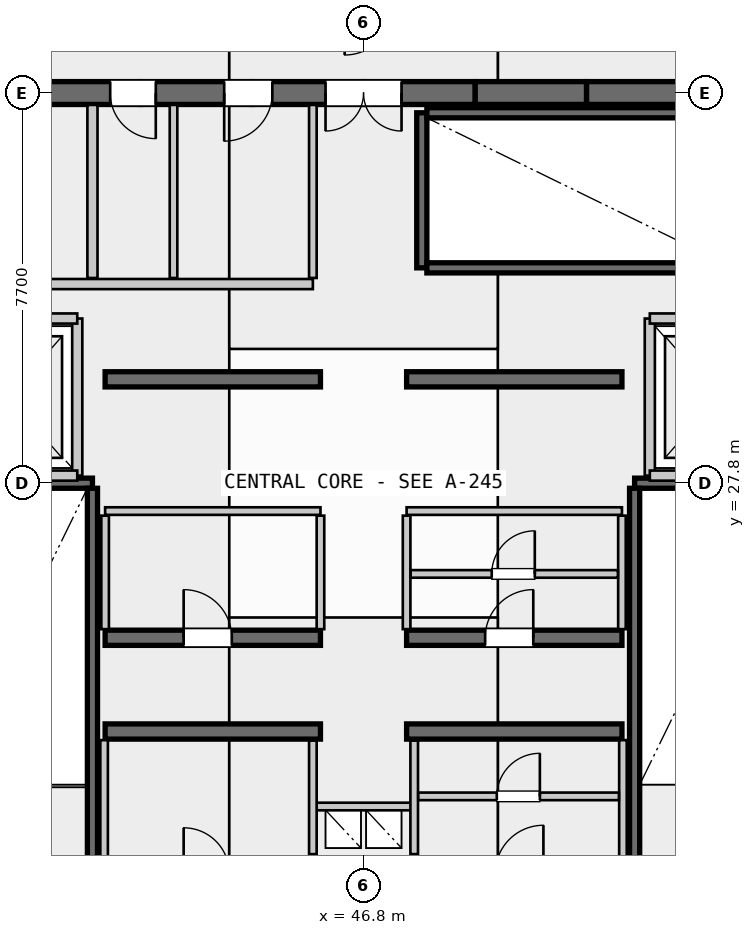
"""IFC4 building model, lengths in metres.
Left out: names, types, materials, properties, quantities, classifications, styles, units other than length and angle.
Written with IfcOpenShell. Run it as: python <this file> out.ifc"""

import sys

from ifc_helpers import new_model, si_unit, direction, frame, frame_2d, origin, place, context, subcontext, project, spatial, rectangle, extrude, source, transform, mapped, element, fill, save


model = new_model("IFC4")
c1 = context("Model", 3, precision=1e-05, world=origin(), true_north=direction((0.0, 1.0)))
c2 = subcontext(c1, "Body", "Model", "MODEL_VIEW")
j1 = project(units=[si_unit("LENGTHUNIT", "METRE"), si_unit("PLANEANGLEUNIT", "RADIAN")], contexts=[c1])
p1 = place(None, origin())
s1 = spatial("IfcSite", under=j1, at=p1, CompositionType="ELEMENT")
p2 = place(p1, origin())
s2 = spatial("IfcBuilding", under=s1, at=p2, CompositionType="ELEMENT")
p3 = place(p2, frame((0.0, 0.0, 324.3)))
s3 = spatial("IfcBuildingStorey", under=s2, at=p3, CompositionType="ELEMENT", Elevation=324.3)
p4 = place(p3, frame((55.6, 35.5, 0.0), z_axis=(0.0, 0.0, 1.0), x_axis=(-1.0, 0.0, 0.0)))
e1 = element("IfcWall", 1, at=p4, inside=s3, PredefinedType="SHEAR", context=c2, shape_type="SweptSolid", body=[
    extrude(rectangle(XDim=17.6, YDim=0.45, at=frame_2d((8.8, 0.0))), origin(), (0.0, 0.0, 1.0), 4.2),
])
p5 = place(p4, frame((8.05, 0.0, 0.0)))
e2 = element("IfcOpeningElement", 2, at=p5, cuts=e1, PredefinedType="OPENING", context=c2, shape_type="SweptSolid", body=[
    extrude(rectangle(XDim=1.5, YDim=2.2, at=frame_2d((0.75, 1.1))), frame((0.0, 0.235, 0.0), z_axis=(0.0, -1.0, 0.0), x_axis=(1.0, 0.0, 0.0)), (0.0, 0.0, 1.0), 0.47),
])
p6 = place(p4, frame((15.1, 0.0, 0.0)))
e3 = element("IfcOpeningElement", 3, at=p6, cuts=e1, PredefinedType="OPENING", context=c2, shape_type="SweptSolid", body=[
    extrude(rectangle(XDim=0.95, YDim=2.15, at=frame_2d((0.475, 1.075))), frame((0.0, 0.235, 0.0), z_axis=(0.0, -1.0, 0.0), x_axis=(1.0, 0.0, 0.0)), (0.0, 0.0, 1.0), 0.47),
])
p7 = place(p4, frame((12.9, 0.0, 0.0)))
e4 = element("IfcOpeningElement", 4, at=p7, cuts=e1, PredefinedType="OPENING", context=c2, shape_type="SweptSolid", body=[
    extrude(rectangle(XDim=0.9, YDim=2.15, at=frame_2d((0.45, 1.075))), frame((0.0, 0.235, 0.0), z_axis=(0.0, -1.0, 0.0), x_axis=(1.0, 0.0, 0.0)), (0.0, 0.0, 1.0), 0.47),
])
p8 = place(p4, frame((10.6, 0.0, 0.0)))
e5 = element("IfcOpeningElement", 5, at=p8, cuts=e1, PredefinedType="OPENING", context=c2, shape_type="SweptSolid", body=[
    extrude(rectangle(XDim=0.95, YDim=2.15, at=frame_2d((0.475, 1.075))), frame((0.0, 0.235, 0.0), z_axis=(0.0, -1.0, 0.0), x_axis=(1.0, 0.0, 0.0)), (0.0, 0.0, 1.0), 0.47),
])
for number, where, z_axis, x_axis in (
    (6, (41.7, 22.9, 0.0), (0.0, 0.0, 1.0), (1.0, 0.0, 0.0)),
    (7, (47.65, 22.9, 0.0), (0.0, 0.0, 1.0), (1.0, 0.0, 0.0)),
):
    element("IfcWall", number, at=place(p3, frame(where, z_axis=z_axis, x_axis=x_axis)), inside=s3, PredefinedType="SHEAR", context=c2, shape_type="SweptSolid", body=[
        extrude(rectangle(XDim=4.25, YDim=0.3, at=frame_2d((2.125, 0.0))), origin(), (0.0, 0.0, 1.0), 4.2),
    ])
p9 = place(p3, frame((41.7, 24.75, 0.0), z_axis=(0.0, 0.0, 1.0), x_axis=(1.0, 0.0, 0.0)))
e8 = element("IfcWall", 8, at=p9, inside=s3, PredefinedType="SHEAR", context=c2, shape_type="SweptSolid", body=[
    extrude(rectangle(XDim=4.25, YDim=0.3, at=frame_2d((2.125, 0.0))), origin(), (0.0, 0.0, 1.0), 4.2),
])
p10 = place(p9, frame((1.55, 0.0, 0.0)))
e9 = element("IfcOpeningElement", 9, at=p10, cuts=e8, PredefinedType="OPENING", context=c2, shape_type="SweptSolid", body=[
    extrude(rectangle(XDim=0.95, YDim=2.15, at=frame_2d((0.475, 1.075))), frame((0.0, 0.16, 0.0), z_axis=(0.0, -1.0, 0.0), x_axis=(1.0, 0.0, 0.0)), (0.0, 0.0, 1.0), 0.32),
])
p11 = place(p3, frame((47.65, 24.75, 0.0), z_axis=(0.0, 0.0, 1.0), x_axis=(1.0, 0.0, 0.0)))
e10 = element("IfcWall", 10, at=p11, inside=s3, PredefinedType="SHEAR", context=c2, shape_type="SweptSolid", body=[
    extrude(rectangle(XDim=4.25, YDim=0.3, at=frame_2d((2.125, 0.0))), origin(), (0.0, 0.0, 1.0), 4.2),
])
p12 = place(p11, frame((1.55, 0.0, 0.0)))
e11 = element("IfcOpeningElement", 11, at=p12, cuts=e10, PredefinedType="OPENING", context=c2, shape_type="SweptSolid", body=[
    extrude(rectangle(XDim=0.95, YDim=2.15, at=frame_2d((0.475, 1.075))), frame((0.0, 0.16, 0.0), z_axis=(0.0, -1.0, 0.0), x_axis=(1.0, 0.0, 0.0)), (0.0, 0.0, 1.0), 0.32),
])
for number, where, z_axis, x_axis in (
    (12, (41.7, 29.85, 0.0), (0.0, 0.0, 1.0), (1.0, 0.0, 0.0)),
    (13, (47.65, 29.85, 0.0), (0.0, 0.0, 1.0), (1.0, 0.0, 0.0)),
):
    element("IfcWall", number, at=place(p3, frame(where, z_axis=z_axis, x_axis=x_axis)), inside=s3, PredefinedType="SHEAR", context=c2, shape_type="SweptSolid", body=[
        extrude(rectangle(XDim=4.25, YDim=0.3, at=frame_2d((2.125, 0.0))), origin(), (0.0, 0.0, 1.0), 4.2),
    ])
p13 = place(p3, frame((53.4, 35.5, 4.2), z_axis=(0.0, 0.0, 1.0), x_axis=(-1.0, 0.0, 0.0)))
e14 = element("IfcWall", 14, at=p13, inside=s3, PredefinedType="SHEAR", context=c2, shape_type="SweptSolid", body=[
    extrude(rectangle(XDim=2.2, YDim=0.45, at=frame_2d((1.1, 0.0))), origin(), (0.0, 0.0, 1.0), 5.216),
])
p14 = place(p3, frame((51.2, 35.5, 4.2), z_axis=(0.0, 0.0, 1.0), x_axis=(-1.0, 0.0, 0.0)))
e15 = element("IfcWall", 15, at=p14, inside=s3, PredefinedType="SHEAR", context=c2, shape_type="SweptSolid", body=[
    extrude(rectangle(XDim=2.2, YDim=0.45, at=frame_2d((1.1, 0.0))), origin(), (0.0, 0.0, 1.0), 5.091),
])
p15 = place(p3, frame((49.0, 35.5, 4.2), z_axis=(0.0, 0.0, 1.0), x_axis=(-1.0, 0.0, 0.0)))
e16 = element("IfcWall", 16, at=p15, inside=s3, PredefinedType="SHEAR", context=c2, shape_type="SweptSolid", body=[
    extrude(rectangle(XDim=2.2, YDim=0.45, at=frame_2d((1.1, 0.0))), origin(), (0.0, 0.0, 1.0), 4.965),
])
p16 = place(p3, frame((46.8, 35.5, 4.2), z_axis=(0.0, 0.0, 1.0), x_axis=(-1.0, 0.0, 0.0)))
e17 = element("IfcWall", 17, at=p16, inside=s3, PredefinedType="SHEAR", context=c2, shape_type="SweptSolid", body=[
    extrude(rectangle(XDim=2.2, YDim=0.45, at=frame_2d((1.1, 0.0))), origin(), (0.0, 0.0, 1.0), 4.839),
])
p17 = place(p3, frame((44.6, 35.5, 4.2), z_axis=(0.0, 0.0, 1.0), x_axis=(-1.0, 0.0, 0.0)))
e18 = element("IfcWall", 18, at=p17, inside=s3, PredefinedType="SHEAR", context=c2, shape_type="SweptSolid", body=[
    extrude(rectangle(XDim=2.2, YDim=0.45, at=frame_2d((1.1, 0.0))), origin(), (0.0, 0.0, 1.0), 4.713),
])
p18 = place(p3, frame((42.4, 35.5, 4.2), z_axis=(0.0, 0.0, 1.0), x_axis=(-1.0, 0.0, 0.0)))
e19 = element("IfcWall", 19, at=p18, inside=s3, PredefinedType="SHEAR", context=c2, shape_type="SweptSolid", body=[
    extrude(rectangle(XDim=2.2, YDim=0.45, at=frame_2d((1.1, 0.0))), origin(), (0.0, 0.0, 1.0), 4.587),
])
p19 = place(p3, frame((38.39, 27.8, 0.0), z_axis=(0.0, 0.0, 1.0), x_axis=(1.0, 0.0, 0.0)))
e20 = element("IfcWall", 20, at=p19, inside=s3, PredefinedType="SHEAR", context=c2, shape_type="SweptSolid", body=[
    extrude(rectangle(XDim=3.06, YDim=0.2, at=frame_2d((1.53, 0.0))), origin(), (0.0, 0.0, 1.0), 4.2),
])
p20 = place(p3, frame((41.45, 27.7, 0.0), z_axis=(0.0, 0.0, 1.0), x_axis=(0.0, -1.0, 0.0)))
e21 = element("IfcWall", 21, at=p20, inside=s3, PredefinedType="SHEAR", context=c2, shape_type="SweptSolid", body=[
    extrude(rectangle(XDim=7.35, YDim=0.2, at=frame_2d((3.675, 0.0))), origin(), (0.0, 0.0, 1.0), 4.2),
])
p21 = place(p3, frame((52.15, 27.8, 0.0), z_axis=(0.0, 0.0, 1.0), x_axis=(1.0, 0.0, 0.0)))
e22 = element("IfcWall", 22, at=p21, inside=s3, PredefinedType="SHEAR", context=c2, shape_type="SweptSolid", body=[
    extrude(rectangle(XDim=3.06, YDim=0.2, at=frame_2d((1.53, 0.0))), origin(), (0.0, 0.0, 1.0), 4.2),
])
p22 = place(p3, frame((52.15, 20.35, 0.0), z_axis=(0.0, 0.0, 1.0), x_axis=(0.0, 1.0, 0.0)))
e23 = element("IfcWall", 23, at=p22, inside=s3, PredefinedType="SHEAR", context=c2, shape_type="SweptSolid", body=[
    extrude(rectangle(XDim=7.35, YDim=0.2, at=frame_2d((3.675, 0.0))), origin(), (0.0, 0.0, 1.0), 4.2),
])
p23 = place(p3, frame((47.95, 32.05, 0.0), z_axis=(0.0, 0.0, 1.0), x_axis=(0.0, 1.0, 0.0)))
e24 = element("IfcWall", 24, at=p23, inside=s3, PredefinedType="SHEAR", context=c2, shape_type="SweptSolid", body=[
    extrude(rectangle(XDim=3.06, YDim=0.2, at=frame_2d((1.53, 0.0))), origin(), (0.0, 0.0, 1.0), 4.2),
])
for number, where, z_axis, x_axis in (
    (25, (48.05, 35.11, 0.0), (0.0, 0.0, 1.0), (1.0, 0.0, 0.0)),
    (26, (55.4, 32.05, 0.0), (0.0, 0.0, 1.0), (-1.0, 0.0, 0.0)),
):
    element("IfcWall", number, at=place(p3, frame(where, z_axis=z_axis, x_axis=x_axis)), inside=s3, PredefinedType="SHEAR", context=c2, shape_type="SweptSolid", body=[
        extrude(rectangle(XDim=7.35, YDim=0.2, at=frame_2d((3.675, 0.0))), origin(), (0.0, 0.0, 1.0), 4.2),
    ])
p24 = place(p3, frame((45.8, 21.42, 0.0), z_axis=(0.0, 0.0, 1.0), x_axis=(1.0, 0.0, 0.0)))
e27 = element("IfcWall", 27, at=p24, inside=s3, PredefinedType="PARTITIONING", context=c2, shape_type="SweptSolid", body=[
    extrude(rectangle(XDim=2.0, YDim=0.15, at=frame_2d((1.0, 0.0))), origin(), (0.0, 0.0, 1.0), 3.49),
])
for number, where, z_axis, x_axis in (
    (28, (45.8, 20.48, 0.0), (0.0, 0.0, 1.0), (0.0, 1.0, 0.0)),
    (29, (47.8, 20.48, 0.0), (0.0, 0.0, 1.0), (0.0, 1.0, 0.0)),
):
    element("IfcWall", number, at=place(p3, frame(where, z_axis=z_axis, x_axis=x_axis)), inside=s3, PredefinedType="PARTITIONING", context=c2, shape_type="SweptSolid", body=[
        extrude(rectangle(XDim=2.24, YDim=0.15, at=frame_2d((1.12, 0.0))), origin(), (0.0, 0.0, 1.0), 3.49),
    ])
p25 = place(p3, frame((41.15, 27.95, 0.0), z_axis=(0.0, 0.0, 1.0), x_axis=(0.0, 1.0, 0.0)))
e30 = element("IfcWall", 30, at=p25, inside=s3, PredefinedType="PARTITIONING", context=c2, shape_type="SweptSolid", body=[
    extrude(rectangle(XDim=3.1, YDim=0.2, at=frame_2d((1.55, 0.0))), origin(), (0.0, 0.0, 1.0), 2.76),
])
for number, where, z_axis, x_axis in (
    (31, (38.235, 27.95, 0.0), (0.0, 0.0, 1.0), (1.0, 0.0, 0.0)),
    (32, (38.235, 31.05, 0.0), (0.0, 0.0, 1.0), (1.0, 0.0, 0.0)),
):
    element("IfcWall", number, at=place(p3, frame(where, z_axis=z_axis, x_axis=x_axis)), inside=s3, PredefinedType="PARTITIONING", context=c2, shape_type="SweptSolid", body=[
        extrude(rectangle(XDim=2.915, YDim=0.2, at=frame_2d((1.458, 0.0))), origin(), (0.0, 0.0, 1.0), 3.49),
    ])
p26 = place(p3, frame((52.45, 27.95, 0.0), z_axis=(0.0, 0.0, 1.0), x_axis=(0.0, 1.0, 0.0)))
e33 = element("IfcWall", 33, at=p26, inside=s3, PredefinedType="PARTITIONING", context=c2, shape_type="SweptSolid", body=[
    extrude(rectangle(XDim=3.1, YDim=0.2, at=frame_2d((1.55, 0.0))), origin(), (0.0, 0.0, 1.0), 2.76),
])
for number, where, z_axis, x_axis in (
    (34, (52.45, 27.95, 0.0), (0.0, 0.0, 1.0), (1.0, 0.0, 0.0)),
    (35, (52.45, 31.05, 0.0), (0.0, 0.0, 1.0), (1.0, 0.0, 0.0)),
):
    element("IfcWall", number, at=place(p3, frame(where, z_axis=z_axis, x_axis=x_axis)), inside=s3, PredefinedType="PARTITIONING", context=c2, shape_type="SweptSolid", body=[
        extrude(rectangle(XDim=2.915, YDim=0.2, at=frame_2d((1.458, 0.0))), origin(), (0.0, 0.0, 1.0), 3.49),
    ])
for number, where, z_axis, x_axis in (
    (36, (41.68, 20.335, 0.0), (0.0, 0.0, 1.0), (0.0, 1.0, 0.0)),
    (37, (51.92, 20.335, 0.0), (0.0, 0.0, 1.0), (0.0, 1.0, 0.0)),
):
    element("IfcWall", number, at=place(p3, frame(where, z_axis=z_axis, x_axis=x_axis)), inside=s3, PredefinedType="PARTITIONING", context=c2, shape_type="SweptSolid", body=[
        extrude(rectangle(XDim=2.395, YDim=0.15, at=frame_2d((1.198, 0.0))), origin(), (0.0, 0.0, 1.0), 3.49),
    ])
p27 = place(p3, frame((47.88, 21.62, 0.0), z_axis=(0.0, 0.0, 1.0), x_axis=(1.0, 0.0, 0.0)))
e38 = element("IfcWall", 38, at=p27, inside=s3, PredefinedType="PARTITIONING", context=c2, shape_type="SweptSolid", body=[
    extrude(rectangle(XDim=3.96, YDim=0.15, at=frame_2d((1.98, 0.0))), origin(), (0.0, 0.0, 1.0), 2.76),
])
p28 = place(p27, frame((1.55, 0.0, 0.0)))
e39 = element("IfcOpeningElement", 39, at=p28, cuts=e38, PredefinedType="OPENING", context=c2, shape_type="SweptSolid", body=[
    extrude(rectangle(XDim=0.85, YDim=2.15, at=frame_2d((0.425, 1.075))), frame((0.0, 0.085, 0.0), z_axis=(0.0, -1.0, 0.0), x_axis=(1.0, 0.0, 0.0)), (0.0, 0.0, 1.0), 0.17),
])
for number, where, z_axis, x_axis in (
    (40, (41.7, 27.25, 0.0), (0.0, 0.0, 1.0), (1.0, 0.0, 0.0)),
    (41, (47.65, 27.25, 0.0), (0.0, 0.0, 1.0), (1.0, 0.0, 0.0)),
):
    element("IfcWall", number, at=place(p3, frame(where, z_axis=z_axis, x_axis=x_axis)), inside=s3, PredefinedType="PARTITIONING", context=c2, shape_type="SweptSolid", body=[
        extrude(rectangle(XDim=4.25, YDim=0.15, at=frame_2d((2.125, 0.0))), origin(), (0.0, 0.0, 1.0), 2.76),
    ])
for number, where, z_axis, x_axis in (
    (42, (41.7, 24.92, 0.0), (0.0, 0.0, 1.0), (0.0, 1.0, 0.0)),
    (43, (45.95, 24.92, 0.0), (0.0, 0.0, 1.0), (0.0, 1.0, 0.0)),
    (44, (47.65, 24.92, 0.0), (0.0, 0.0, 1.0), (0.0, 1.0, 0.0)),
    (45, (51.9, 24.92, 0.0), (0.0, 0.0, 1.0), (0.0, 1.0, 0.0)),
):
    element("IfcWall", number, at=place(p3, frame(where, z_axis=z_axis, x_axis=x_axis)), inside=s3, PredefinedType="PARTITIONING", context=c2, shape_type="SweptSolid", body=[
        extrude(rectangle(XDim=2.24, YDim=0.15, at=frame_2d((1.12, 0.0))), origin(), (0.0, 0.0, 1.0), 2.76),
    ])
p29 = place(p3, frame((47.73, 26.01, 0.0), z_axis=(0.0, 0.0, 1.0), x_axis=(1.0, 0.0, 0.0)))
e46 = element("IfcWall", 46, at=p29, inside=s3, PredefinedType="PARTITIONING", context=c2, shape_type="SweptSolid", body=[
    extrude(rectangle(XDim=4.09, YDim=0.15, at=frame_2d((2.045, 0.0))), origin(), (0.0, 0.0, 1.0), 2.76),
])
p30 = place(p29, frame((1.6, 0.0, 0.0)))
e47 = element("IfcOpeningElement", 47, at=p30, cuts=e46, PredefinedType="OPENING", context=c2, shape_type="SweptSolid", body=[
    extrude(rectangle(XDim=0.85, YDim=2.15, at=frame_2d((0.425, 1.075))), frame((0.0, 0.085, 0.0), z_axis=(0.0, -1.0, 0.0), x_axis=(1.0, 0.0, 0.0)), (0.0, 0.0, 1.0), 0.17),
])
p31 = place(p3, frame((41.45, 31.85, 0.0), z_axis=(0.0, 0.0, 1.0), x_axis=(0.0, 1.0, 0.0)))
e48 = element("IfcWall", 48, at=p31, inside=s3, PredefinedType="PARTITIONING", context=c2, shape_type="SweptSolid", body=[
    extrude(rectangle(XDim=3.415, YDim=0.2, at=frame_2d((1.708, 0.0))), origin(), (0.0, 0.0, 1.0), 3.49),
])
p32 = place(p3, frame((38.235, 31.73, 0.0), z_axis=(0.0, 0.0, 1.0), x_axis=(1.0, 0.0, 0.0)))
e49 = element("IfcWall", 49, at=p32, inside=s3, PredefinedType="PARTITIONING", context=c2, shape_type="SweptSolid", body=[
    extrude(rectangle(XDim=7.565, YDim=0.2, at=frame_2d((3.782, 0.0))), origin(), (0.0, 0.0, 1.0), 2.76),
])
p33 = place(p3, frame((45.8, 31.85, 0.0), z_axis=(0.0, 0.0, 1.0), x_axis=(0.0, 1.0, 0.0)))
e50 = element("IfcWall", 50, at=p33, inside=s3, PredefinedType="PARTITIONING", context=c2, shape_type="SweptSolid", body=[
    extrude(rectangle(XDim=3.415, YDim=0.15, at=frame_2d((1.708, 0.0))), origin(), (0.0, 0.0, 1.0), 3.49),
])
p34 = place(p3, frame((43.05, 31.85, 0.0), z_axis=(0.0, 0.0, 1.0), x_axis=(0.0, 1.0, 0.0)))
e51 = element("IfcWall", 51, at=p34, inside=s3, PredefinedType="PLUMBINGWALL", context=c2, shape_type="SweptSolid", body=[
    extrude(rectangle(XDim=3.415, YDim=0.15, at=frame_2d((1.708, 0.0))), origin(), (0.0, 0.0, 1.0), 3.49),
])
m1 = source(origin(), c2, "Body", "SweptSolid", [
    extrude(rectangle(XDim=1.5, YDim=2.2, at=frame_2d((0.75, 1.1))), frame((0.0, 0.025, 0.0), z_axis=(0.0, -1.0, 0.0), x_axis=(1.0, 0.0, 0.0)), (0.0, 0.0, 1.0), 0.05),
])
p35 = place(p5, origin())
e52 = element("IfcDoor", 52, at=p35, inside=s3, OperationType="DOUBLE_DOOR_SINGLE_SWING", PredefinedType="DOOR", context=c2, shape_type="MappedRepresentation", body=[
    mapped(m1, transform((0.0, 0.0, 0.0), scale=1.0)),
])
fill(e2, e52)
m2 = source(origin(), c2, "Body", "SweptSolid", [
    extrude(rectangle(XDim=0.95, YDim=2.15, at=frame_2d((0.475, 1.075))), frame((0.0, 0.025, 0.0), z_axis=(0.0, -1.0, 0.0), x_axis=(1.0, 0.0, 0.0)), (0.0, 0.0, 1.0), 0.05),
])
p36 = place(p10, origin())
e53 = element("IfcDoor", 53, at=p36, inside=s3, OperationType="SINGLE_SWING_LEFT", PredefinedType="DOOR", context=c2, shape_type="MappedRepresentation", body=[
    mapped(m2, transform((0.0, 0.0, 0.0), scale=1.0)),
])
fill(e9, e53)
p37 = place(p12, origin())
e54 = element("IfcDoor", 54, at=p37, inside=s3, OperationType="SINGLE_SWING_RIGHT", PredefinedType="DOOR", context=c2, shape_type="MappedRepresentation", body=[
    mapped(m2, transform((0.0, 0.0, 0.0), scale=1.0)),
])
fill(e11, e54)
m3 = source(origin(), c2, "Body", "SweptSolid", [
    extrude(rectangle(XDim=0.9, YDim=2.15, at=frame_2d((0.45, 1.075))), frame((0.0, 0.025, 0.0), z_axis=(0.0, -1.0, 0.0), x_axis=(1.0, 0.0, 0.0)), (0.0, 0.0, 1.0), 0.05),
])
p38 = place(p7, origin())
e55 = element("IfcDoor", 55, at=p38, inside=s3, OperationType="SINGLE_SWING_LEFT", PredefinedType="DOOR", context=c2, shape_type="MappedRepresentation", body=[
    mapped(m3, transform((0.0, 0.0, 0.0), scale=1.0)),
])
fill(e4, e55)
p39 = place(p8, origin())
e56 = element("IfcDoor", 56, at=p39, inside=s3, OperationType="SINGLE_SWING_RIGHT", PredefinedType="DOOR", context=c2, shape_type="MappedRepresentation", body=[
    mapped(m2, transform((0.0, 0.0, 0.0), scale=1.0)),
])
fill(e5, e56)
m4 = source(origin(), c2, "Body", "SweptSolid", [
    extrude(rectangle(XDim=0.85, YDim=2.15, at=frame_2d((0.425, 1.075))), frame((0.0, 0.025, 0.0), z_axis=(0.0, -1.0, 0.0), x_axis=(1.0, 0.0, 0.0)), (0.0, 0.0, 1.0), 0.05),
])
p40 = place(p28, origin())
e57 = element("IfcDoor", 57, at=p40, inside=s3, OperationType="SINGLE_SWING_RIGHT", PredefinedType="DOOR", context=c2, shape_type="MappedRepresentation", body=[
    mapped(m4, transform((0.0, 0.0, 0.0), scale=1.0)),
])
fill(e39, e57)
p41 = place(p30, origin())
e58 = element("IfcDoor", 58, at=p41, inside=s3, OperationType="SINGLE_SWING_RIGHT", PredefinedType="DOOR", context=c2, shape_type="MappedRepresentation", body=[
    mapped(m4, transform((0.0, 0.0, 0.0), scale=1.0)),
])
fill(e47, e58)
save(model, sys.argv[1])
